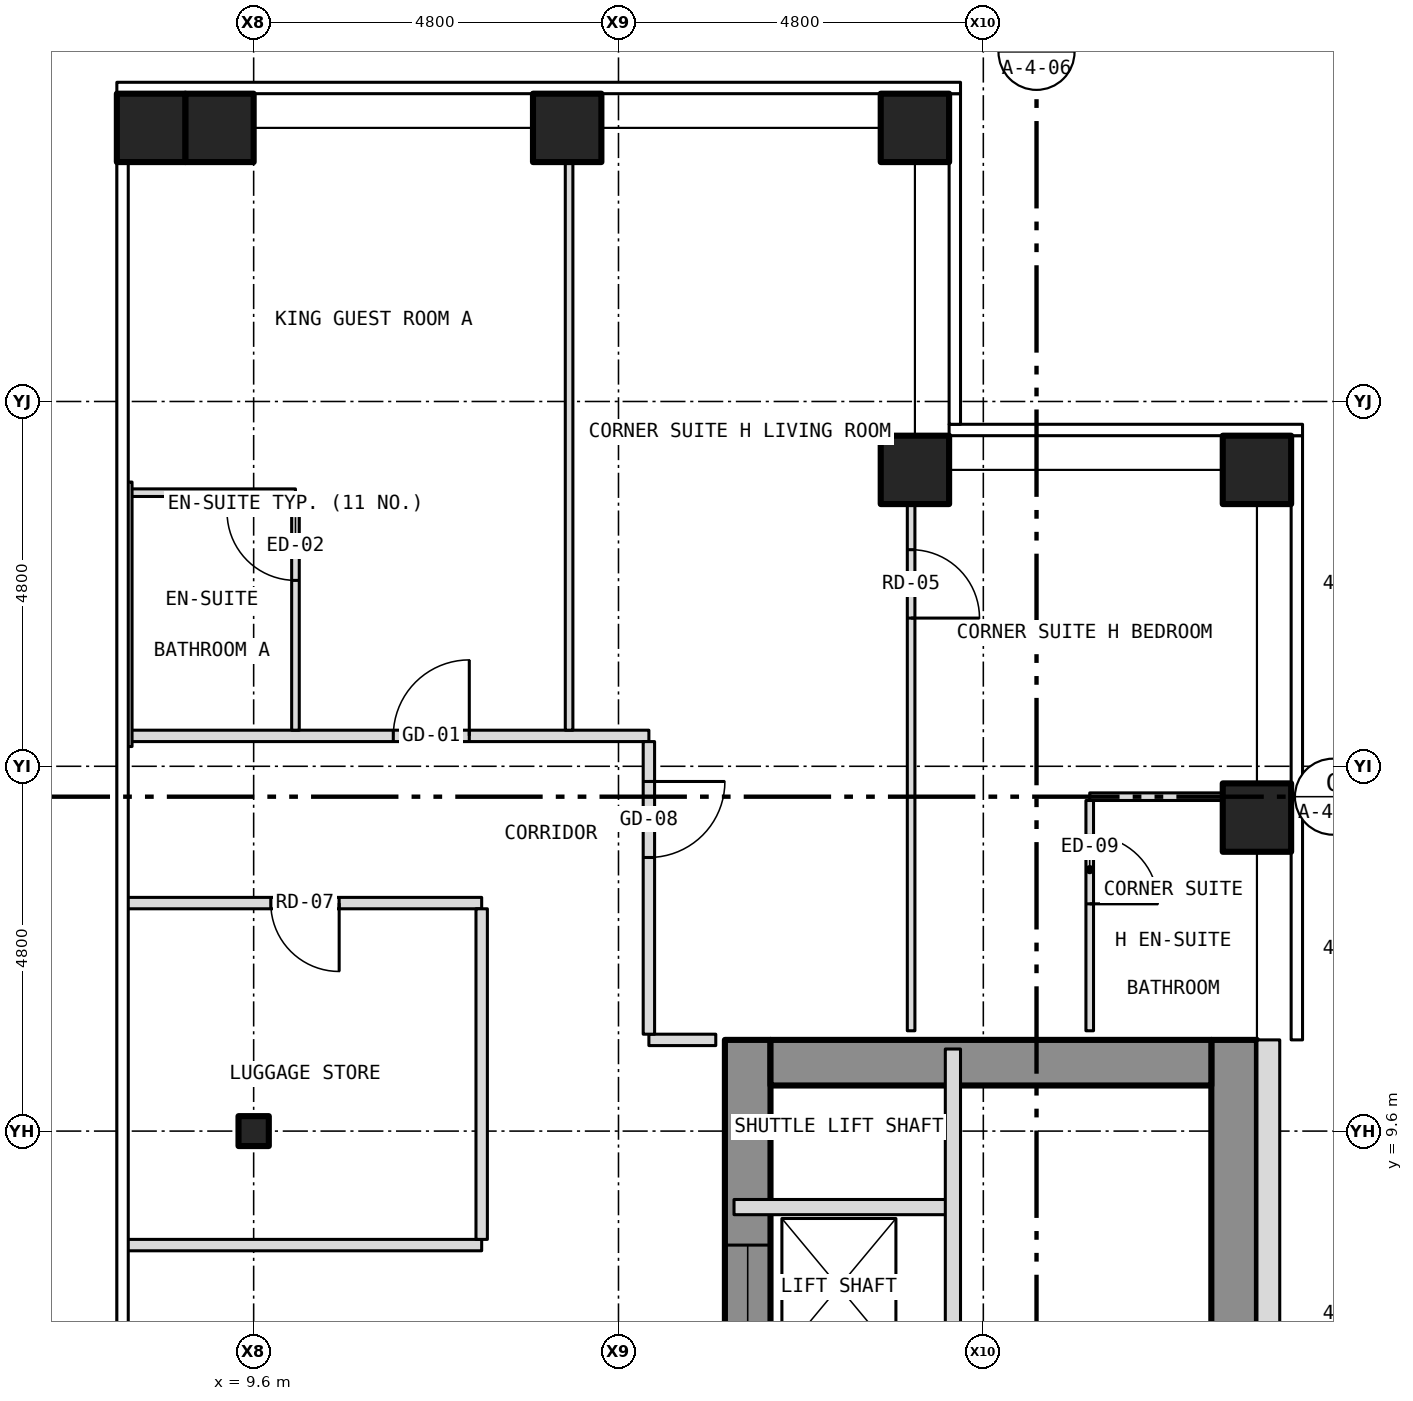
"""IFC4 building model, lengths in metres.
Left out: names, types, materials, properties, quantities, classifications, styles, units other than length and angle.
Written with IfcOpenShell. Run it as: python <this file> out.ifc"""

import sys

from ifc_helpers import new_model, si_unit, direction, frame, frame_2d, origin, origin_2d, place, context, subcontext, project, spatial, rectangle, hollow_rectangle, i_section, extrude, element, fill, save


model = new_model("IFC4")
c1 = context("Model", 3, precision=1e-05, world=origin(), true_north=direction((0.0, 1.0)))
c2 = subcontext(c1, "Body", "Model", "MODEL_VIEW")
j1 = project(units=[si_unit("LENGTHUNIT", "METRE"), si_unit("PLANEANGLEUNIT", "RADIAN")], contexts=[c1])
p1 = place(None, origin())
s1 = spatial("IfcSite", under=j1, at=p1, CompositionType="ELEMENT")
p2 = place(p1, origin())
s2 = spatial("IfcBuilding", under=s1, at=p2, CompositionType="ELEMENT")
p3 = place(p2, frame((0.0, 0.0, 124.0)))
s3 = spatial("IfcBuildingStorey", under=s2, at=p3, CompositionType="ELEMENT", Elevation=124.0)
for number, where, z_axis, x_axis in (
    (1, (9.15, 22.8, -0.15), (0.0, 0.0, 1.0), (1.0, 0.0, 0.0)),
    (2, (13.725, 22.8, -0.15), (0.0, 0.0, 1.0), (1.0, 0.0, 0.0)),
    (3, (18.3, 22.8, -0.15), (0.0, 0.0, 1.0), (1.0, 0.0, 0.0)),
    (4, (22.8, 13.725, -0.15), (0.0, 0.0, 1.0), (1.0, 0.0, 0.0)),
    (5, (22.8, 18.3, -0.15), (0.0, 0.0, 1.0), (1.0, 0.0, 0.0)),
    (6, (18.3, 18.3, -0.15), (0.0, 0.0, 1.0), (1.0, 0.0, 0.0)),
    (7, (8.25, 22.8, -0.15), (0.0, 0.0, 1.0), (1.0, 0.0, 0.0)),
):
    element("IfcColumn", number, at=place(p3, frame(where, z_axis=z_axis, x_axis=x_axis)), inside=s3, PredefinedType="COLUMN", context=c2, shape_type="SweptSolid", body=[
        extrude(hollow_rectangle(XDim=0.9, YDim=0.9, WallThickness=0.05, at=origin_2d()), origin(), (0.0, 0.0, 1.0), 3.5),
    ])
p4 = place(p3, frame((9.6, 9.6, -0.15), z_axis=(0.0, 0.0, 1.0), x_axis=(1.0, 0.0, 0.0)))
e8 = element("IfcColumn", 8, at=p4, inside=s3, PredefinedType="COLUMN", context=c2, shape_type="SweptSolid", body=[
    extrude(i_section(OverallWidth=0.399, OverallDepth=0.394, WebThickness=0.023, FlangeThickness=0.037, at=origin_2d()), origin(), (0.0, 0.0, 1.0), 3.5),
])
p5 = place(p3, frame((16.1, -10.8, 0.0), z_axis=(0.0, 0.0, 1.0), x_axis=(0.0, 1.0, 0.0)))
e9 = element("IfcWall", 9, at=p5, inside=s3, PredefinedType="SHEAR", context=c2, shape_type="SweptSolid", body=[
    extrude(rectangle(XDim=21.6, YDim=0.6, at=frame_2d((10.8, 0.0))), origin(), (0.0, 0.0, 1.0), 3.25),
])
p6 = place(p5, frame((9.4, 0.0, 0.0)))
e10 = element("IfcOpeningElement", 10, at=p6, cuts=e9, PredefinedType="OPENING", context=c2, shape_type="SweptSolid", body=[
    extrude(rectangle(XDim=1.1, YDim=2.1, at=frame_2d((0.55, 1.05))), frame((0.0, 0.312, 0.0), z_axis=(0.0, -1.0, 0.0), x_axis=(1.0, 0.0, 0.0)), (0.0, 0.0, 1.0), 0.624),
])
p7 = place(p5, frame((11.5, 0.0, 0.0)))
e11 = element("IfcOpeningElement", 11, at=p7, cuts=e9, PredefinedType="OPENING", context=c2, shape_type="SweptSolid", body=[
    extrude(rectangle(XDim=1.1, YDim=2.1, at=frame_2d((0.55, 1.05))), frame((0.0, 0.312, 0.0), z_axis=(0.0, -1.0, 0.0), x_axis=(1.0, 0.0, 0.0)), (0.0, 0.0, 1.0), 0.624),
])
p8 = place(p5, frame((13.6, 0.0, 0.0)))
e12 = element("IfcOpeningElement", 12, at=p8, cuts=e9, PredefinedType="OPENING", context=c2, shape_type="SweptSolid", body=[
    extrude(rectangle(XDim=1.1, YDim=2.1, at=frame_2d((0.55, 1.05))), frame((0.0, 0.312, 0.0), z_axis=(0.0, -1.0, 0.0), x_axis=(1.0, 0.0, 0.0)), (0.0, 0.0, 1.0), 0.624),
])
p9 = place(p5, frame((15.7, 0.0, 0.0)))
e13 = element("IfcOpeningElement", 13, at=p9, cuts=e9, PredefinedType="OPENING", context=c2, shape_type="SweptSolid", body=[
    extrude(rectangle(XDim=1.1, YDim=2.1, at=frame_2d((0.55, 1.05))), frame((0.0, 0.312, 0.0), z_axis=(0.0, -1.0, 0.0), x_axis=(1.0, 0.0, 0.0)), (0.0, 0.0, 1.0), 0.624),
])
p10 = place(p5, frame((17.8, 0.0, 0.0)))
e14 = element("IfcOpeningElement", 14, at=p10, cuts=e9, PredefinedType="OPENING", context=c2, shape_type="SweptSolid", body=[
    extrude(rectangle(XDim=1.1, YDim=2.1, at=frame_2d((0.55, 1.05))), frame((0.0, 0.312, 0.0), z_axis=(0.0, -1.0, 0.0), x_axis=(1.0, 0.0, 0.0)), (0.0, 0.0, 1.0), 0.624),
])
p11 = place(p5, frame((5.642, 0.0, 0.0)))
e15 = element("IfcOpeningElement", 15, at=p11, cuts=e9, PredefinedType="OPENING", context=c2, shape_type="SweptSolid", body=[
    extrude(rectangle(XDim=1.1, YDim=2.1, at=frame_2d((0.55, 1.05))), frame((0.0, 0.312, 0.0), z_axis=(0.0, -1.0, 0.0), x_axis=(1.0, 0.0, 0.0)), (0.0, 0.0, 1.0), 0.624),
])
p12 = place(p5, frame((7.5, 0.0, 0.0)))
e16 = element("IfcOpeningElement", 16, at=p12, cuts=e9, PredefinedType="OPENING", context=c2, shape_type="SweptSolid", body=[
    extrude(rectangle(XDim=1.1, YDim=2.1, at=frame_2d((0.55, 1.05))), frame((0.0, 0.312, 0.0), z_axis=(0.0, -1.0, 0.0), x_axis=(1.0, 0.0, 0.0)), (0.0, 0.0, 1.0), 0.624),
])
p13 = place(p3, frame((22.5, -10.8, 0.0), z_axis=(0.0, 0.0, 1.0), x_axis=(0.0, 1.0, 0.0)))
e17 = element("IfcWall", 17, at=p13, inside=s3, PredefinedType="SHEAR", context=c2, shape_type="SweptSolid", body=[
    extrude(rectangle(XDim=21.6, YDim=0.6, at=frame_2d((10.8, 0.0))), origin(), (0.0, 0.0, 1.0), 3.25),
])
p14 = place(p3, frame((16.4, 10.5, 0.0), z_axis=(0.0, 0.0, 1.0), x_axis=(1.0, 0.0, 0.0)))
e18 = element("IfcWall", 18, at=p14, inside=s3, PredefinedType="SHEAR", context=c2, shape_type="SweptSolid", body=[
    extrude(rectangle(XDim=5.8, YDim=0.6, at=frame_2d((2.9, 0.0))), origin(), (0.0, 0.0, 1.0), 3.25),
])
p15 = place(p3, frame((22.95, -10.8, 0.0), z_axis=(0.0, 0.0, 1.0), x_axis=(0.0, 1.0, 0.0)))
e19 = element("IfcWall", 19, at=p15, inside=s3, PredefinedType="SOLIDWALL", context=c2, shape_type="SweptSolid", body=[
    extrude(rectangle(XDim=21.6, YDim=0.3, at=frame_2d((10.8, 0.0))), origin(), (0.0, 0.0, 1.0), 3.5),
])
p16 = place(p15, frame((2.95, 0.0, 1.0)))
e20 = element("IfcOpeningElement", 20, at=p16, cuts=e19, PredefinedType="OPENING", context=c2, shape_type="SweptSolid", body=[
    extrude(rectangle(XDim=0.6, YDim=1.5, at=frame_2d((0.3, 0.75))), frame((0.0, 0.162, 0.0), z_axis=(0.0, -1.0, 0.0), x_axis=(1.0, 0.0, 0.0)), (0.0, 0.0, 1.0), 0.324),
])
p17 = place(p3, frame((7.92, 8.1, 0.0), z_axis=(0.0, 0.0, 1.0), x_axis=(1.0, 0.0, 0.0)))
e21 = element("IfcWall", 21, at=p17, inside=s3, PredefinedType="PARTITIONING", context=c2, shape_type="SweptSolid", body=[
    extrude(rectangle(XDim=4.68, YDim=0.15, at=frame_2d((2.34, 0.0))), origin(), (0.0, 0.0, 1.0), 3.35),
])
p18 = place(p3, frame((15.92, 8.6, 0.0), z_axis=(0.0, 0.0, 1.0), x_axis=(1.0, 0.0, 0.0)))
e22 = element("IfcWall", 22, at=p18, inside=s3, PredefinedType="PARTITIONING", context=c2, shape_type="SweptSolid", body=[
    extrude(rectangle(XDim=2.88, YDim=0.2, at=frame_2d((1.44, 0.0))), origin(), (0.0, 0.0, 1.0), 3.25),
])
p19 = place(p3, frame((14.8, 10.8, 0.0), z_axis=(0.0, 0.0, 1.0), x_axis=(1.0, 0.0, 0.0)))
e23 = element("IfcWall", 23, at=p19, inside=s3, PredefinedType="PARTITIONING", context=c2, shape_type="SweptSolid", body=[
    extrude(rectangle(XDim=0.88, YDim=0.15, at=frame_2d((0.44, 0.0))), origin(), (0.0, 0.0, 1.0), 3.35),
])
p20 = place(p3, frame((7.92, 12.6, 0.0), z_axis=(0.0, 0.0, 1.0), x_axis=(1.0, 0.0, 0.0)))
e24 = element("IfcWall", 24, at=p20, inside=s3, PredefinedType="PARTITIONING", context=c2, shape_type="SweptSolid", body=[
    extrude(rectangle(XDim=4.68, YDim=0.15, at=frame_2d((2.34, 0.0))), origin(), (0.0, 0.0, 1.0), 3.35),
])
p21 = place(p20, frame((1.905, 0.0, 0.0)))
e25 = element("IfcOpeningElement", 25, at=p21, cuts=e24, PredefinedType="OPENING", context=c2, shape_type="SweptSolid", body=[
    extrude(rectangle(XDim=0.9, YDim=2.1, at=frame_2d((0.45, 1.05))), frame((0.0, 0.087, 0.0), z_axis=(0.0, -1.0, 0.0), x_axis=(1.0, 0.0, 0.0)), (0.0, 0.0, 1.0), 0.174),
])
p22 = place(p3, frame((20.6, 14.0, 0.0), z_axis=(0.0, 0.0, 1.0), x_axis=(1.0, 0.0, 0.0)))
e26 = element("IfcWall", 26, at=p22, inside=s3, PredefinedType="PARTITIONING", context=c2, shape_type="SweptSolid", body=[
    extrude(rectangle(XDim=2.08, YDim=0.1, at=frame_2d((1.04, 0.0))), origin(), (0.0, 0.0, 1.0), 3.35),
])
p23 = place(p3, frame((7.95, 14.8, 0.0), z_axis=(0.0, 0.0, 1.0), x_axis=(1.0, 0.0, 0.0)))
e27 = element("IfcWall", 27, at=p23, inside=s3, PredefinedType="PARTITIONING", context=c2, shape_type="SweptSolid", body=[
    extrude(rectangle(XDim=6.85, YDim=0.15, at=frame_2d((3.425, 0.0))), origin(), (0.0, 0.0, 1.0), 3.35),
])
p24 = place(p23, frame((3.487, 0.0, 0.0)))
e28 = element("IfcOpeningElement", 28, at=p24, cuts=e27, PredefinedType="OPENING", context=c2, shape_type="SweptSolid", body=[
    extrude(rectangle(XDim=1.0, YDim=2.1, at=frame_2d((0.5, 1.05))), frame((0.0, 0.087, 0.0), z_axis=(0.0, -1.0, 0.0), x_axis=(1.0, 0.0, 0.0)), (0.0, 0.0, 1.0), 0.174),
])
p25 = place(p3, frame((7.95, 18.0, 0.0), z_axis=(0.0, 0.0, 1.0), x_axis=(1.0, 0.0, 0.0)))
e29 = element("IfcWall", 29, at=p25, inside=s3, PredefinedType="PARTITIONING", context=c2, shape_type="SweptSolid", body=[
    extrude(rectangle(XDim=2.2, YDim=0.1, at=frame_2d((1.1, 0.0))), origin(), (0.0, 0.0, 1.0), 3.35),
])
p26 = place(p3, frame((7.95, 14.66, 0.0), z_axis=(0.0, 0.0, 1.0), x_axis=(0.0, 1.0, 0.0)))
e30 = element("IfcWall", 30, at=p26, inside=s3, PredefinedType="PARTITIONING", context=c2, shape_type="SweptSolid", body=[
    extrude(rectangle(XDim=3.48, YDim=0.1, at=frame_2d((1.74, 0.0))), origin(), (0.0, 0.0, 1.0), 2.733),
])
p27 = place(p3, frame((10.15, 14.875, 0.0), z_axis=(0.0, 0.0, 1.0), x_axis=(0.0, 1.0, 0.0)))
e31 = element("IfcWall", 31, at=p27, inside=s3, PredefinedType="PARTITIONING", context=c2, shape_type="SweptSolid", body=[
    extrude(rectangle(XDim=3.075, YDim=0.1, at=frame_2d((1.538, 0.0))), origin(), (0.0, 0.0, 1.0), 3.35),
])
p28 = place(p27, frame((1.971, 0.0, 0.0)))
e32 = element("IfcOpeningElement", 32, at=p28, cuts=e31, PredefinedType="OPENING", context=c2, shape_type="SweptSolid", body=[
    extrude(rectangle(XDim=0.9, YDim=2.1, at=frame_2d((0.45, 1.05))), frame((0.0, 0.062, 0.0), z_axis=(0.0, -1.0, 0.0), x_axis=(1.0, 0.0, 0.0)), (0.0, 0.0, 1.0), 0.124),
])
p29 = place(p3, frame((12.6, 8.175, 0.0), z_axis=(0.0, 0.0, 1.0), x_axis=(0.0, 1.0, 0.0)))
e33 = element("IfcWall", 33, at=p29, inside=s3, PredefinedType="PARTITIONING", context=c2, shape_type="SweptSolid", body=[
    extrude(rectangle(XDim=4.35, YDim=0.15, at=frame_2d((2.175, 0.0))), origin(), (0.0, 0.0, 1.0), 3.35),
])
p30 = place(p3, frame((13.75, 14.875, 0.0), z_axis=(0.0, 0.0, 1.0), x_axis=(0.0, 1.0, 0.0)))
e34 = element("IfcWall", 34, at=p30, inside=s3, PredefinedType="PARTITIONING", context=c2, shape_type="SweptSolid", body=[
    extrude(rectangle(XDim=7.805, YDim=0.1, at=frame_2d((3.902, 0.0))), origin(), (0.0, 0.0, 1.0), 3.35),
])
p31 = place(p3, frame((14.8, 10.875, 0.0), z_axis=(0.0, 0.0, 1.0), x_axis=(0.0, 1.0, 0.0)))
e35 = element("IfcWall", 35, at=p31, inside=s3, PredefinedType="PARTITIONING", context=c2, shape_type="SweptSolid", body=[
    extrude(rectangle(XDim=3.85, YDim=0.15, at=frame_2d((1.925, 0.0))), origin(), (0.0, 0.0, 1.0), 3.35),
])
p32 = place(p31, frame((2.325, 0.0, 0.0)))
e36 = element("IfcOpeningElement", 36, at=p32, cuts=e35, PredefinedType="OPENING", context=c2, shape_type="SweptSolid", body=[
    extrude(rectangle(XDim=1.0, YDim=2.1, at=frame_2d((0.5, 1.05))), frame((0.0, 0.087, 0.0), z_axis=(0.0, -1.0, 0.0), x_axis=(1.0, 0.0, 0.0)), (0.0, 0.0, 1.0), 0.174),
])
p33 = place(p3, frame((18.25, 10.92, 0.0), z_axis=(0.0, 0.0, 1.0), x_axis=(0.0, 1.0, 0.0)))
e37 = element("IfcWall", 37, at=p33, inside=s3, PredefinedType="PARTITIONING", context=c2, shape_type="SweptSolid", body=[
    extrude(rectangle(XDim=7.271, YDim=0.1, at=frame_2d((3.635, 0.0))), origin(), (0.0, 0.0, 1.0), 3.35),
])
p34 = place(p33, frame((5.43, 0.0, 0.0)))
e38 = element("IfcOpeningElement", 38, at=p34, cuts=e37, PredefinedType="OPENING", context=c2, shape_type="SweptSolid", body=[
    extrude(rectangle(XDim=0.9, YDim=2.1, at=frame_2d((0.45, 1.05))), frame((0.0, 0.062, 0.0), z_axis=(0.0, -1.0, 0.0), x_axis=(1.0, 0.0, 0.0)), (0.0, 0.0, 1.0), 0.124),
])
p35 = place(p3, frame((18.8, -1.8, 0.0), z_axis=(0.0, 0.0, 1.0), x_axis=(0.0, 1.0, 0.0)))
e39 = element("IfcWall", 39, at=p35, inside=s3, PredefinedType="PARTITIONING", context=c2, shape_type="SweptSolid", body=[
    extrude(rectangle(XDim=12.48, YDim=0.2, at=frame_2d((6.24, 0.0))), origin(), (0.0, 0.0, 1.0), 3.25),
])
p36 = place(p3, frame((20.6, 10.92, 0.0), z_axis=(0.0, 0.0, 1.0), x_axis=(0.0, 1.0, 0.0)))
e40 = element("IfcWall", 40, at=p36, inside=s3, PredefinedType="PARTITIONING", context=c2, shape_type="SweptSolid", body=[
    extrude(rectangle(XDim=3.03, YDim=0.1, at=frame_2d((1.515, 0.0))), origin(), (0.0, 0.0, 1.0), 3.35),
])
p37 = place(p36, frame((1.67, 0.0, 0.0)))
e41 = element("IfcOpeningElement", 41, at=p37, cuts=e40, PredefinedType="OPENING", context=c2, shape_type="SweptSolid", body=[
    extrude(rectangle(XDim=0.9, YDim=2.1, at=frame_2d((0.45, 1.05))), frame((0.0, 0.062, 0.0), z_axis=(0.0, -1.0, 0.0), x_axis=(1.0, 0.0, 0.0)), (0.0, 0.0, 1.0), 0.124),
])
p38 = place(p10, origin())
e42 = element("IfcDoor", 42, at=p38, inside=s3, OperationType="SLIDING_TO_LEFT", PredefinedType="DOOR", context=c2, shape_type="SweptSolid", body=[
    extrude(rectangle(XDim=1.1, YDim=2.1, at=frame_2d((0.55, 1.05))), frame((0.0, 0.025, 0.0), z_axis=(0.0, -1.0, 0.0), x_axis=(1.0, 0.0, 0.0)), (0.0, 0.0, 1.0), 0.05),
])
fill(e14, e42)
p39 = place(p24, origin())
e43 = element("IfcDoor", 43, at=p39, inside=s3, OperationType="SINGLE_SWING_RIGHT", PredefinedType="DOOR", context=c2, shape_type="SweptSolid", body=[
    extrude(rectangle(XDim=1.0, YDim=2.1, at=frame_2d((0.5, 1.05))), frame((0.0, 0.025, 0.0), z_axis=(0.0, -1.0, 0.0), x_axis=(1.0, 0.0, 0.0)), (0.0, 0.0, 1.0), 0.05),
])
fill(e28, e43)
p40 = place(p28, origin())
e44 = element("IfcDoor", 44, at=p40, inside=s3, OperationType="SINGLE_SWING_RIGHT", PredefinedType="DOOR", context=c2, shape_type="SweptSolid", body=[
    extrude(rectangle(XDim=0.9, YDim=2.1, at=frame_2d((0.45, 1.05))), frame((0.0, 0.025, 0.0), z_axis=(0.0, -1.0, 0.0), x_axis=(1.0, 0.0, 0.0)), (0.0, 0.0, 1.0), 0.05),
])
fill(e32, e44)
p41 = place(p32, origin())
e45 = element("IfcDoor", 45, at=p41, inside=s3, OperationType="SINGLE_SWING_RIGHT", PredefinedType="DOOR", context=c2, shape_type="SweptSolid", body=[
    extrude(rectangle(XDim=1.0, YDim=2.1, at=frame_2d((0.5, 1.05))), frame((0.0, 0.025, 0.0), z_axis=(0.0, -1.0, 0.0), x_axis=(1.0, 0.0, 0.0)), (0.0, 0.0, 1.0), 0.05),
])
fill(e36, e45)
p42 = place(p34, origin())
e46 = element("IfcDoor", 46, at=p42, inside=s3, OperationType="SINGLE_SWING_LEFT", PredefinedType="DOOR", context=c2, shape_type="SweptSolid", body=[
    extrude(rectangle(XDim=0.9, YDim=2.1, at=frame_2d((0.45, 1.05))), frame((0.0, 0.025, 0.0), z_axis=(0.0, -1.0, 0.0), x_axis=(1.0, 0.0, 0.0)), (0.0, 0.0, 1.0), 0.05),
])
fill(e38, e46)
p43 = place(p37, origin())
e47 = element("IfcDoor", 47, at=p43, inside=s3, OperationType="SINGLE_SWING_LEFT", PredefinedType="DOOR", context=c2, shape_type="SweptSolid", body=[
    extrude(rectangle(XDim=0.9, YDim=2.1, at=frame_2d((0.45, 1.05))), frame((0.0, 0.025, 0.0), z_axis=(0.0, -1.0, 0.0), x_axis=(1.0, 0.0, 0.0)), (0.0, 0.0, 1.0), 0.05),
])
fill(e41, e47)
p44 = place(p21, origin())
e48 = element("IfcDoor", 48, at=p44, inside=s3, OperationType="SINGLE_SWING_RIGHT", PredefinedType="DOOR", context=c2, shape_type="SweptSolid", body=[
    extrude(rectangle(XDim=0.9, YDim=2.1, at=frame_2d((0.45, 1.05))), frame((0.0, 0.025, 0.0), z_axis=(0.0, -1.0, 0.0), x_axis=(1.0, 0.0, 0.0)), (0.0, 0.0, 1.0), 0.05),
])
fill(e25, e48)
save(model, sys.argv[1])
